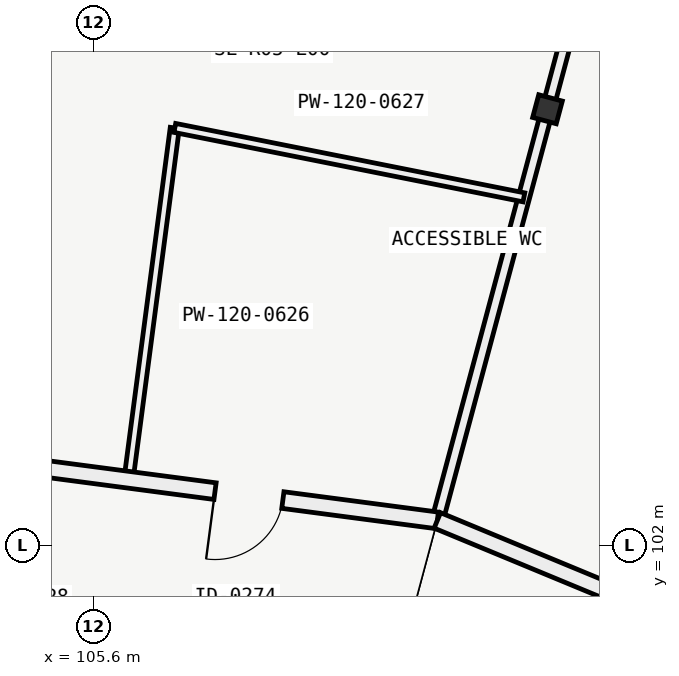
"""IFC4 building model, lengths in metres.
Left out: names, types, materials, properties, quantities, classifications, styles, units other than length and angle.
Written with IfcOpenShell. Run it as: python <this file> out.ifc"""

import sys

from ifc_helpers import new_model, si_unit, direction, frame, frame_2d, origin, origin_2d, place, context, subcontext, project, spatial, rectangle, i_section, extrude, element, fill, save


model = new_model("IFC4")
c1 = context("Model", 3, precision=1e-05, world=origin(), true_north=direction((0.0, 1.0)))
c2 = subcontext(c1, "Body", "Model", "MODEL_VIEW")
j1 = project(units=[si_unit("LENGTHUNIT", "METRE"), si_unit("PLANEANGLEUNIT", "RADIAN")], contexts=[c1])
p1 = place(None, origin())
s1 = spatial("IfcSite", under=j1, at=p1, CompositionType="ELEMENT")
p2 = place(p1, origin())
s2 = spatial("IfcBuilding", under=s1, at=p2, CompositionType="ELEMENT")
p3 = place(p2, origin())
s3 = spatial("IfcBuildingStorey", under=s2, at=p3, CompositionType="ELEMENT", Elevation=0.0)
p4 = place(p3, frame((111.576, 107.739, -0.4), z_axis=(0.0, 0.0, 1.0), x_axis=(0.258819045103, 0.965925826289, 0.0)))
e1 = element("IfcColumn", 1, at=p4, inside=s3, PredefinedType="COLUMN", context=c2, shape_type="SweptSolid", body=[
    extrude(i_section(OverallWidth=0.309, OverallDepth=0.321, WebThickness=0.014, FlangeThickness=0.022, FilletRadius=0.017, at=origin_2d()), origin(), (0.0, 0.0, 1.0), 5.8),
])
p5 = place(p3, frame((110.127, 102.33, 0.0), z_axis=(0.0, 0.0, 1.0), x_axis=(0.258810530041, 0.965928107853, 0.0)))
e2 = element("IfcWall", 2, at=p5, inside=s3, PredefinedType="PARTITIONING", context=c2, shape_type="SweptSolid", body=[
    extrude(rectangle(XDim=14.48, YDim=0.15, at=frame_2d((7.24, 0.0))), origin(), (0.0, 0.0, 1.0), 4.567),
])
p6 = place(p3, frame((106.063, 102.865, 0.0), z_axis=(0.0, 0.0, 1.0), x_axis=(0.130526207551, 0.991444859356, 0.0)))
e3 = element("IfcWall", 3, at=p6, inside=s3, PredefinedType="PARTITIONING", context=c2, shape_type="SweptSolid", body=[
    extrude(rectangle(XDim=4.669, YDim=0.12, at=frame_2d((2.334, 0.0))), origin(), (0.0, 0.0, 1.0), 4.844),
])
p7 = place(p3, frame((111.266, 106.58, 0.0), z_axis=(0.0, 0.0, 1.0), x_axis=(-0.980784676414, 0.195093358449, 0.0)))
e4 = element("IfcWall", 4, at=p7, inside=s3, PredefinedType="PARTITIONING", context=c2, shape_type="SweptSolid", body=[
    extrude(rectangle(XDim=4.683, YDim=0.12, at=frame_2d((2.341, 0.0))), origin(), (0.0, 0.0, 1.0), 4.567),
])
p8 = place(p3, frame((110.127, 102.33, 0.0), z_axis=(0.0, 0.0, 1.0), x_axis=(-0.991446589332, 0.130513066404, 0.0)))
e5 = element("IfcWall", 5, at=p8, inside=s3, PredefinedType="PARTITIONING", context=c2, shape_type="SweptSolid", body=[
    extrude(rectangle(XDim=8.197, YDim=0.22, at=frame_2d((4.099, 0.0))), origin(), (0.0, 0.0, 1.0), 4.567),
])
p9 = place(p8, frame((2.05, 0.0, 0.0)))
e6 = element("IfcOpeningElement", 6, at=p9, cuts=e5, PredefinedType="OPENING", context=c2, shape_type="SweptSolid", body=[
    extrude(rectangle(XDim=0.9, YDim=2.05, at=frame_2d((0.45, 1.025))), frame((0.0, 0.12, 0.0), z_axis=(0.0, -1.0, 0.0), x_axis=(1.0, 0.0, 0.0)), (0.0, 0.0, 1.0), 0.24),
])
p10 = place(p8, frame((6.15, 0.0, 0.0)))
e7 = element("IfcOpeningElement", 7, at=p10, cuts=e5, PredefinedType="OPENING", context=c2, shape_type="SweptSolid", body=[
    extrude(rectangle(XDim=1.5, YDim=2.2, at=frame_2d((0.75, 1.1))), frame((0.0, 0.12, 0.0), z_axis=(0.0, -1.0, 0.0), x_axis=(1.0, 0.0, 0.0)), (0.0, 0.0, 1.0), 0.24),
])
p11 = place(p3, frame((117.7, 99.193, 0.0), z_axis=(0.0, 0.0, 1.0), x_axis=(-0.923874167149, 0.382696385238, 0.0)))
e8 = element("IfcWall", 8, at=p11, inside=s3, PredefinedType="PARTITIONING", context=c2, shape_type="SweptSolid", body=[
    extrude(rectangle(XDim=8.197, YDim=0.22, at=frame_2d((4.099, 0.0))), origin(), (0.0, 0.0, 1.0), 4.567),
])
p12 = place(p9, origin())
e9 = element("IfcDoor", 9, at=p12, inside=s3, OperationType="SINGLE_SWING_RIGHT", PredefinedType="DOOR", context=c2, shape_type="SweptSolid", body=[
    extrude(rectangle(XDim=0.9, YDim=2.05, at=frame_2d((0.45, 1.025))), frame((0.0, 0.025, 0.0), z_axis=(0.0, -1.0, 0.0), x_axis=(1.0, 0.0, 0.0)), (0.0, 0.0, 1.0), 0.05),
])
fill(e6, e9)
save(model, sys.argv[1])
